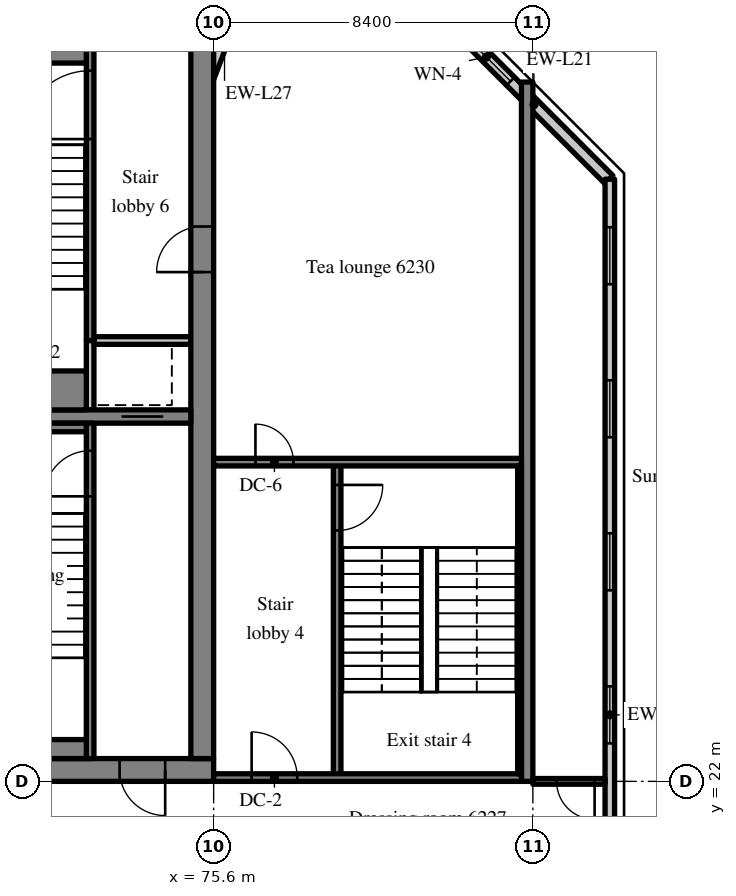
"""IFC4 building model, lengths in metres.
Left out: names, types, materials, properties, quantities, classifications, styles, units other than length and angle.
Written with IfcOpenShell. Run it as: python <this file> out.ifc"""

import sys

from ifc_helpers import new_model, si_unit, direction, frame, frame_2d, origin, place, context, subcontext, project, spatial, rectangle, extrude, source, transform, mapped, element, fill, save


model = new_model("IFC4")
c1 = context("Model", 3, precision=1e-05, world=origin(), true_north=direction((0.0, 1.0)))
c2 = subcontext(c1, "Body", "Model", "MODEL_VIEW")
j1 = project(units=[si_unit("LENGTHUNIT", "METRE"), si_unit("PLANEANGLEUNIT", "RADIAN")], contexts=[c1])
p1 = place(None, origin())
s1 = spatial("IfcSite", under=j1, at=p1, CompositionType="ELEMENT")
p2 = place(p1, origin())
s2 = spatial("IfcBuilding", under=s1, at=p2, CompositionType="ELEMENT")
p3 = place(p2, frame((0.0, 0.0, 256.9)))
s3 = spatial("IfcBuildingStorey", under=s2, at=p3, CompositionType="ELEMENT", Elevation=256.9)
m1 = source(origin(), c2, "Body", "SweptSolid", [
    extrude(rectangle(XDim=50.4, YDim=0.6, at=frame_2d((25.2, 0.0))), origin(), (0.0, 0.0, 1.0), 3.62),
])
p4 = place(p3, frame((25.2, 22.3, 0.0), z_axis=(0.0, 0.0, 1.0), x_axis=(1.0, 0.0, 0.0)))
e1 = element("IfcWall", 1, at=p4, inside=s3, PredefinedType="SHEAR", context=c2, shape_type="MappedRepresentation", body=[
    mapped(m1, transform((0.0, 0.0, 0.0), scale=1.0)),
])
m2 = source(origin(), c2, "Body", "SweptSolid", [
    extrude(rectangle(XDim=1.8, YDim=2.1, at=frame_2d((0.9, 1.05))), frame((0.0, 0.31, 0.0), z_axis=(0.0, -1.0, 0.0), x_axis=(1.0, 0.0, 0.0)), (0.0, 0.0, 1.0), 0.62),
])
p5 = place(p4, frame((15.9, 0.0, 0.0)))
e2 = element("IfcOpeningElement", 2, at=p5, cuts=e1, PredefinedType="OPENING", context=c2, shape_type="MappedRepresentation", body=[
    mapped(m2, transform((0.0, 0.0, 0.0), scale=1.0)),
])
m3 = source(origin(), c2, "Body", "SweptSolid", [
    extrude(rectangle(XDim=0.9, YDim=2.1, at=frame_2d((0.45, 1.05))), frame((0.0, 0.31, 0.0), z_axis=(0.0, -1.0, 0.0), x_axis=(1.0, 0.0, 0.0)), (0.0, 0.0, 1.0), 0.62),
])
p6 = place(p4, frame((21.513, 0.0, 0.0)))
e3 = element("IfcOpeningElement", 3, at=p6, cuts=e1, PredefinedType="OPENING", context=c2, shape_type="MappedRepresentation", body=[
    mapped(m3, transform((0.0, 0.0, 0.0), scale=1.0)),
])
p7 = place(p4, frame((32.7, 0.0, 0.0)))
e4 = element("IfcOpeningElement", 4, at=p7, cuts=e1, PredefinedType="OPENING", context=c2, shape_type="MappedRepresentation", body=[
    mapped(m2, transform((0.0, 0.0, 0.0), scale=1.0)),
])
m4 = source(origin(), c2, "Body", "SweptSolid", [
    extrude(rectangle(XDim=1.2, YDim=2.1, at=frame_2d((0.6, 1.05))), frame((0.0, 0.31, 0.0), z_axis=(0.0, -1.0, 0.0), x_axis=(1.0, 0.0, 0.0)), (0.0, 0.0, 1.0), 0.62),
])
p8 = place(p4, frame((6.488, 0.0, 0.0)))
e5 = element("IfcOpeningElement", 5, at=p8, cuts=e1, PredefinedType="OPENING", context=c2, shape_type="MappedRepresentation", body=[
    mapped(m4, transform((0.0, 0.0, 0.0), scale=1.0)),
])
p9 = place(p4, frame((47.925, 0.0, 0.0)))
e6 = element("IfcOpeningElement", 6, at=p9, cuts=e1, PredefinedType="OPENING", context=c2, shape_type="MappedRepresentation", body=[
    mapped(m4, transform((0.0, 0.0, 0.0), scale=1.0)),
])
m5 = source(origin(), c2, "Body", "SweptSolid", [
    extrude(rectangle(XDim=18.8, YDim=0.6, at=frame_2d((9.4, 0.0))), origin(), (0.0, 0.0, 1.0), 3.62),
])
p10 = place(p3, frame((75.3, 22.6, 0.0), z_axis=(0.0, 0.0, 1.0), x_axis=(0.0, 1.0, 0.0)))
e7 = element("IfcWall", 7, at=p10, inside=s3, PredefinedType="SHEAR", context=c2, shape_type="MappedRepresentation", body=[
    mapped(m5, transform((0.0, 0.0, 0.0), scale=1.0)),
])
p11 = place(p10, frame((12.8, 0.0, 0.0)))
e8 = element("IfcOpeningElement", 8, at=p11, cuts=e7, PredefinedType="OPENING", context=c2, shape_type="MappedRepresentation", body=[
    mapped(m4, transform((0.0, 0.0, 0.0), scale=1.0)),
])
m6 = source(origin(), c2, "Body", "SweptSolid", [
    extrude(rectangle(XDim=7.625, YDim=0.35, at=frame_2d((3.812, 0.0))), origin(), (0.0, 0.0, 1.0), 3.62),
])
p12 = place(p3, frame((67.375, 31.6, 0.0), z_axis=(0.0, 0.0, 1.0), x_axis=(1.0, 0.0, 0.0)))
e9 = element("IfcWall", 9, at=p12, inside=s3, PredefinedType="SHEAR", context=c2, shape_type="MappedRepresentation", body=[
    mapped(m6, transform((0.0, 0.0, 0.0), scale=1.0)),
])
m7 = source(origin(), c2, "Body", "SweptSolid", [
    extrude(rectangle(XDim=1.1, YDim=2.1, at=frame_2d((0.55, 1.05))), frame((0.0, 0.185, 0.0), z_axis=(0.0, -1.0, 0.0), x_axis=(1.0, 0.0, 0.0)), (0.0, 0.0, 1.0), 0.37),
])
p13 = place(p12, frame((5.8, 0.0, 0.0)))
e10 = element("IfcOpeningElement", 10, at=p13, cuts=e9, PredefinedType="OPENING", context=c2, shape_type="MappedRepresentation", body=[
    mapped(m7, transform((0.0, 0.0, 0.0), scale=1.0)),
])
m8 = source(origin(), c2, "Body", "SweptSolid", [
    extrude(rectangle(XDim=18.4, YDim=0.3, at=frame_2d((9.2, 0.0))), origin(), (0.0, 0.0, 1.0), 3.62),
])
p14 = place(p3, frame((83.85, 22.0, 0.0), z_axis=(0.0, 0.0, 1.0), x_axis=(0.0, 1.0, 0.0)))
e11 = element("IfcWall", 11, at=p14, inside=s3, PredefinedType="SHEAR", context=c2, shape_type="MappedRepresentation", body=[
    mapped(m8, transform((0.0, 0.0, 0.0), scale=1.0)),
])
m9 = source(origin(), c2, "Body", "SweptSolid", [
    extrude(rectangle(XDim=5.576, YDim=0.3, at=frame_2d((2.788, 0.0))), origin(), (0.0, 0.0, 1.0), 3.62),
])
p15 = place(p3, frame((86.0, 37.834, 0.0), z_axis=(0.0, 0.0, 1.0), x_axis=(-0.707106781187, 0.707106781187, 0.0)))
e12 = element("IfcWall", 12, at=p15, inside=s3, PredefinedType="SOLIDWALL", context=c2, shape_type="MappedRepresentation", body=[
    mapped(m9, transform((0.0, 0.0, 0.0), scale=1.0)),
])
m10 = source(origin(), c2, "Body", "SweptSolid", [
    extrude(rectangle(XDim=1.8, YDim=1.5, at=frame_2d((0.9, 0.75))), frame((0.0, 0.16, 0.0), z_axis=(0.0, -1.0, 0.0), x_axis=(1.0, 0.0, 0.0)), (0.0, 0.0, 1.0), 0.32),
])
p16 = place(p15, frame((3.658, 0.0, 0.9)))
e13 = element("IfcOpeningElement", 13, at=p16, cuts=e12, PredefinedType="OPENING", context=c2, shape_type="MappedRepresentation", body=[
    mapped(m10, transform((0.0, 0.0, 0.0), scale=1.0)),
])
m11 = source(origin(), c2, "Body", "SweptSolid", [
    extrude(rectangle(XDim=3.559, YDim=0.3, at=frame_2d((1.78, 0.0))), origin(), (0.0, 0.0, 1.0), 3.62),
])
p17 = place(p3, frame((76.523, 43.292, 0.0), z_axis=(0.0, 0.0, 1.0), x_axis=(-0.35779745313, -0.933799219604, 0.0)))
e14 = element("IfcWall", 14, at=p17, inside=s3, PredefinedType="SOLIDWALL", context=c2, shape_type="MappedRepresentation", body=[
    mapped(m11, transform((0.0, 0.0, 0.0), scale=1.0)),
])
m12 = source(origin(), c2, "Body", "SweptSolid", [
    extrude(rectangle(XDim=1.5, YDim=2.0, at=frame_2d((0.75, 1.0))), frame((0.0, 0.16, 0.0), z_axis=(0.0, -1.0, 0.0), x_axis=(1.0, 0.0, 0.0)), (0.0, 0.0, 1.0), 0.32),
])
p18 = place(p17, frame((0.156, 0.0, 0.9)))
e15 = element("IfcOpeningElement", 15, at=p18, cuts=e14, PredefinedType="OPENING", context=c2, shape_type="MappedRepresentation", body=[
    mapped(m12, transform((0.0, 0.0, 0.0), scale=1.0)),
])
m13 = source(origin(), c2, "Body", "SweptSolid", [
    extrude(rectangle(XDim=28.189, YDim=0.25, at=frame_2d((14.095, 0.0))), origin(), (0.0, 0.0, 1.0), 3.62),
])
p19 = place(p3, frame((86.025, 9.655, 0.0), z_axis=(0.0, 0.0, 1.0), x_axis=(0.0, 1.0, 0.0)))
e16 = element("IfcWall", 16, at=p19, inside=s3, PredefinedType="SOLIDWALL", context=c2, shape_type="MappedRepresentation", body=[
    mapped(m13, transform((0.0, 0.0, 0.0), scale=1.0)),
])
m14 = source(origin(), c2, "Body", "SweptSolid", [
    extrude(rectangle(XDim=1.5, YDim=1.5, at=frame_2d((0.75, 0.75))), frame((0.0, 0.135, 0.0), z_axis=(0.0, -1.0, 0.0), x_axis=(1.0, 0.0, 0.0)), (0.0, 0.0, 1.0), 0.27),
])
p20 = place(p19, frame((1.263, 0.0, 0.9)))
e17 = element("IfcOpeningElement", 17, at=p20, cuts=e16, PredefinedType="OPENING", context=c2, shape_type="MappedRepresentation", body=[
    mapped(m14, transform((0.0, 0.0, 0.0), scale=1.0)),
])
p21 = place(p19, frame((5.291, 0.0, 0.9)))
e18 = element("IfcOpeningElement", 18, at=p21, cuts=e16, PredefinedType="OPENING", context=c2, shape_type="MappedRepresentation", body=[
    mapped(m14, transform((0.0, 0.0, 0.0), scale=1.0)),
])
p22 = place(p19, frame((9.318, 0.0, 0.9)))
e19 = element("IfcOpeningElement", 19, at=p22, cuts=e16, PredefinedType="OPENING", context=c2, shape_type="MappedRepresentation", body=[
    mapped(m14, transform((0.0, 0.0, 0.0), scale=1.0)),
])
p23 = place(p19, frame((13.345, 0.0, 0.9)))
e20 = element("IfcOpeningElement", 20, at=p23, cuts=e16, PredefinedType="OPENING", context=c2, shape_type="MappedRepresentation", body=[
    mapped(m14, transform((0.0, 0.0, 0.0), scale=1.0)),
])
p24 = place(p19, frame((17.372, 0.0, 0.9)))
e21 = element("IfcOpeningElement", 21, at=p24, cuts=e16, PredefinedType="OPENING", context=c2, shape_type="MappedRepresentation", body=[
    mapped(m14, transform((0.0, 0.0, 0.0), scale=1.0)),
])
p25 = place(p19, frame((21.399, 0.0, 0.9)))
e22 = element("IfcOpeningElement", 22, at=p25, cuts=e16, PredefinedType="OPENING", context=c2, shape_type="MappedRepresentation", body=[
    mapped(m14, transform((0.0, 0.0, 0.0), scale=1.0)),
])
p26 = place(p19, frame((25.426, 0.0, 0.9)))
e23 = element("IfcOpeningElement", 23, at=p26, cuts=e16, PredefinedType="OPENING", context=c2, shape_type="MappedRepresentation", body=[
    mapped(m14, transform((0.0, 0.0, 0.0), scale=1.0)),
])
m15 = source(origin(), c2, "Body", "SweptSolid", [
    extrude(rectangle(XDim=8.825, YDim=0.2, at=frame_2d((4.413, 0.0))), origin(), (0.0, 0.0, 1.0), 3.62),
])
p27 = place(p3, frame((72.35, 22.6, 0.0), z_axis=(0.0, 0.0, 1.0), x_axis=(0.0, 1.0, 0.0)))
e24 = element("IfcWall", 24, at=p27, inside=s3, PredefinedType="SOLIDWALL", context=c2, shape_type="MappedRepresentation", body=[
    mapped(m15, transform((0.0, 0.0, 0.0), scale=1.0)),
])
m16 = source(origin(), c2, "Body", "SweptSolid", [
    extrude(rectangle(XDim=1.2, YDim=2.1, at=frame_2d((0.6, 1.05))), frame((0.0, 0.11, 0.0), z_axis=(0.0, -1.0, 0.0), x_axis=(1.0, 0.0, 0.0)), (0.0, 0.0, 1.0), 0.22),
])
p28 = place(p27, frame((6.9, 0.0, 0.0)))
e25 = element("IfcOpeningElement", 25, at=p28, cuts=e24, PredefinedType="OPENING", context=c2, shape_type="MappedRepresentation", body=[
    mapped(m16, transform((0.0, 0.0, 0.0), scale=1.0)),
])
m17 = source(origin(), c2, "Body", "SweptSolid", [
    extrude(rectangle(XDim=1.825, YDim=0.2, at=frame_2d((0.913, 0.0))), origin(), (0.0, 0.0, 1.0), 3.62),
])
p29 = place(p3, frame((72.35, 31.775, 0.0), z_axis=(0.0, 0.0, 1.0), x_axis=(0.0, 1.0, 0.0)))
e26 = element("IfcWall", 26, at=p29, inside=s3, PredefinedType="SOLIDWALL", context=c2, shape_type="MappedRepresentation", body=[
    mapped(m17, transform((0.0, 0.0, 0.0), scale=1.0)),
])
m18 = source(origin(), c2, "Body", "SweptSolid", [
    extrude(rectangle(XDim=2.55, YDim=0.2, at=frame_2d((1.275, 0.0))), origin(), (0.0, 0.0, 1.0), 3.62),
])
p30 = place(p3, frame((72.45, 33.6, 0.0), z_axis=(0.0, 0.0, 1.0), x_axis=(1.0, 0.0, 0.0)))
e27 = element("IfcWall", 27, at=p30, inside=s3, PredefinedType="SOLIDWALL", context=c2, shape_type="MappedRepresentation", body=[
    mapped(m18, transform((0.0, 0.0, 0.0), scale=1.0)),
])
m19 = source(origin(), c2, "Body", "SweptSolid", [
    extrude(rectangle(XDim=7.8, YDim=0.2, at=frame_2d((3.9, 0.0))), origin(), (0.0, 0.0, 1.0), 3.62),
])
p31 = place(p3, frame((72.35, 33.6, 0.0), z_axis=(0.0, 0.0, 1.0), x_axis=(0.0, 1.0, 0.0)))
e28 = element("IfcWall", 28, at=p31, inside=s3, PredefinedType="SOLIDWALL", context=c2, shape_type="MappedRepresentation", body=[
    mapped(m19, transform((0.0, 0.0, 0.0), scale=1.0)),
])
m20 = source(origin(), c2, "Body", "SweptSolid", [
    extrude(rectangle(XDim=1.8, YDim=2.1, at=frame_2d((0.9, 1.05))), frame((0.0, 0.11, 0.0), z_axis=(0.0, -1.0, 0.0), x_axis=(1.0, 0.0, 0.0)), (0.0, 0.0, 1.0), 0.22),
])
p32 = place(p31, frame((5.3, 0.0, 0.0)))
e29 = element("IfcOpeningElement", 29, at=p32, cuts=e28, PredefinedType="OPENING", context=c2, shape_type="MappedRepresentation", body=[
    mapped(m20, transform((0.0, 0.0, 0.0), scale=1.0)),
])
m21 = source(origin(), c2, "Body", "SweptSolid", [
    extrude(rectangle(XDim=8.3, YDim=0.2, at=frame_2d((4.15, 0.0))), origin(), (0.0, 0.0, 1.0), 3.62),
])
p33 = place(p3, frame((78.85, 22.1, 0.0), z_axis=(0.0, 0.0, 1.0), x_axis=(0.0, 1.0, 0.0)))
e30 = element("IfcWall", 30, at=p33, inside=s3, PredefinedType="SOLIDWALL", context=c2, shape_type="MappedRepresentation", body=[
    mapped(m21, transform((0.0, 0.0, 0.0), scale=1.0)),
])
p34 = place(p33, frame((6.5, 0.0, 0.0)))
e31 = element("IfcOpeningElement", 31, at=p34, cuts=e30, PredefinedType="OPENING", context=c2, shape_type="MappedRepresentation", body=[
    mapped(m16, transform((0.0, 0.0, 0.0), scale=1.0)),
])
m22 = source(origin(), c2, "Body", "SweptSolid", [
    extrude(rectangle(XDim=8.1, YDim=0.2, at=frame_2d((4.05, 0.0))), origin(), (0.0, 0.0, 1.0), 3.62),
])
p35 = place(p3, frame((83.7, 22.1, 0.0), z_axis=(0.0, 0.0, 1.0), x_axis=(-1.0, 0.0, 0.0)))
e32 = element("IfcWall", 32, at=p35, inside=s3, PredefinedType="SOLIDWALL", context=c2, shape_type="MappedRepresentation", body=[
    mapped(m22, transform((0.0, 0.0, 0.0), scale=1.0)),
])
p36 = place(p35, frame((5.9, 0.0, 0.0)))
e33 = element("IfcOpeningElement", 33, at=p36, cuts=e32, PredefinedType="OPENING", context=c2, shape_type="MappedRepresentation", body=[
    mapped(m16, transform((0.0, 0.0, 0.0), scale=1.0)),
])
p37 = place(p3, frame((83.7, 30.4, 0.0), z_axis=(0.0, 0.0, 1.0), x_axis=(-1.0, 0.0, 0.0)))
e34 = element("IfcWall", 34, at=p37, inside=s3, PredefinedType="SOLIDWALL", context=c2, shape_type="MappedRepresentation", body=[
    mapped(m22, transform((0.0, 0.0, 0.0), scale=1.0)),
])
m23 = source(origin(), c2, "Body", "SweptSolid", [
    extrude(rectangle(XDim=1.0, YDim=2.1, at=frame_2d((0.5, 1.05))), frame((0.0, 0.11, 0.0), z_axis=(0.0, -1.0, 0.0), x_axis=(1.0, 0.0, 0.0)), (0.0, 0.0, 1.0), 0.22),
])
p38 = place(p37, frame((6.0, 0.0, 0.0)))
e35 = element("IfcOpeningElement", 35, at=p38, cuts=e34, PredefinedType="OPENING", context=c2, shape_type="MappedRepresentation", body=[
    mapped(m23, transform((0.0, 0.0, 0.0), scale=1.0)),
])
m24 = source(origin(), c2, "Body", "SweptSolid", [
    extrude(rectangle(XDim=4.875, YDim=0.5, at=frame_2d((2.438, 0.0))), origin(), (0.0, 0.0, 1.0), 3.62),
])
p39 = place(p3, frame((67.375, 22.85, 0.0), z_axis=(0.0, 0.0, 1.0), x_axis=(1.0, 0.0, 0.0)))
e36 = element("IfcWall", 36, at=p39, inside=s3, PredefinedType="SOLIDWALL", context=c2, shape_type="MappedRepresentation", body=[
    mapped(m24, transform((0.0, 0.0, 0.0), scale=1.0)),
])
m25 = source(origin(), c2, "Body", "SweptSolid", [
    extrude(rectangle(XDim=4.875, YDim=0.225, at=frame_2d((2.438, 0.0))), origin(), (0.0, 0.0, 1.0), 3.62),
])
p40 = place(p3, frame((67.375, 31.312, 0.0), z_axis=(0.0, 0.0, 1.0), x_axis=(1.0, 0.0, 0.0)))
e37 = element("IfcWall", 37, at=p40, inside=s3, PredefinedType="SOLIDWALL", context=c2, shape_type="MappedRepresentation", body=[
    mapped(m25, transform((0.0, 0.0, 0.0), scale=1.0)),
])
p41 = place(p3, frame((67.375, 41.15, 0.0), z_axis=(0.0, 0.0, 1.0), x_axis=(1.0, 0.0, 0.0)))
e38 = element("IfcWall", 38, at=p41, inside=s3, PredefinedType="SOLIDWALL", context=c2, shape_type="MappedRepresentation", body=[
    mapped(m24, transform((0.0, 0.0, 0.0), scale=1.0)),
])
m26 = source(origin(), c2, "Body", "SweptSolid", [
    extrude(rectangle(XDim=4.875, YDim=1.025, at=frame_2d((2.438, 0.0))), origin(), (0.0, 0.0, 1.0), 3.62),
])
p42 = place(p3, frame((67.375, 32.287, 0.0), z_axis=(0.0, 0.0, 1.0), x_axis=(1.0, 0.0, 0.0)))
e39 = element("IfcWall", 39, at=p42, inside=s3, PredefinedType="SOLIDWALL", context=c2, shape_type="MappedRepresentation", body=[
    mapped(m26, transform((0.0, 0.0, 0.0), scale=1.0)),
])
m27 = source(origin(), c2, "Body", "SweptSolid", [
    extrude(rectangle(XDim=8.1, YDim=0.1, at=frame_2d((4.05, 0.0))), origin(), (0.0, 0.0, 1.0), 3.62),
])
p43 = place(p3, frame((83.65, 22.2, 0.0), z_axis=(0.0, 0.0, 1.0), x_axis=(0.0, 1.0, 0.0)))
e40 = element("IfcWall", 40, at=p43, inside=s3, PredefinedType="SOLIDWALL", context=c2, shape_type="MappedRepresentation", body=[
    mapped(m27, transform((0.0, 0.0, 0.0), scale=1.0)),
])
m28 = source(origin(), c2, "Body", "SweptSolid", [
    extrude(rectangle(XDim=1.9, YDim=0.15, at=frame_2d((0.95, 0.0))), origin(), (0.0, 0.0, 1.0), 2.92),
])
p44 = place(p3, frame((84.0, 22.0, 0.0), z_axis=(0.0, 0.0, 1.0), x_axis=(1.0, 0.0, 0.0)))
e41 = element("IfcWall", 41, at=p44, inside=s3, PredefinedType="PARTITIONING", context=c2, shape_type="MappedRepresentation", body=[
    mapped(m28, transform((0.0, 0.0, 0.0), scale=1.0)),
])
m29 = source(origin(), c2, "Body", "SweptSolid", [
    extrude(rectangle(XDim=1.0, YDim=2.1, at=frame_2d((0.5, 1.05))), frame((0.0, 0.085, 0.0), z_axis=(0.0, -1.0, 0.0), x_axis=(1.0, 0.0, 0.0)), (0.0, 0.0, 1.0), 0.17),
])
p45 = place(p44, frame((0.625, 0.0, 0.0)))
e42 = element("IfcOpeningElement", 42, at=p45, cuts=e41, PredefinedType="OPENING", context=c2, shape_type="MappedRepresentation", body=[
    mapped(m29, transform((0.0, 0.0, 0.0), scale=1.0)),
])
m30 = source(origin(), c2, "Body", "SweptSolid", [
    extrude(rectangle(XDim=1.8, YDim=1.5, at=frame_2d((0.9, 0.75))), frame((0.0, 0.03, 0.0), z_axis=(0.0, -1.0, 0.0), x_axis=(1.0, 0.0, 0.0)), (0.0, 0.0, 1.0), 0.06),
])
p46 = place(p16, origin())
e43 = element("IfcWindow", 43, at=p46, inside=s3, PartitioningType="SINGLE_PANEL", PredefinedType="WINDOW", context=c2, shape_type="MappedRepresentation", body=[
    mapped(m30, transform((0.0, 0.0, 0.0), scale=1.0)),
])
fill(e13, e43)
m31 = source(origin(), c2, "Body", "SweptSolid", [
    extrude(rectangle(XDim=1.5, YDim=1.5, at=frame_2d((0.75, 0.75))), frame((0.0, 0.03, 0.0), z_axis=(0.0, -1.0, 0.0), x_axis=(1.0, 0.0, 0.0)), (0.0, 0.0, 1.0), 0.06),
])
p47 = place(p23, origin())
e44 = element("IfcWindow", 44, at=p47, inside=s3, PartitioningType="SINGLE_PANEL", PredefinedType="WINDOW", context=c2, shape_type="MappedRepresentation", body=[
    mapped(m31, transform((0.0, 0.0, 0.0), scale=1.0)),
])
fill(e20, e44)
p48 = place(p24, origin())
e45 = element("IfcWindow", 45, at=p48, inside=s3, PartitioningType="SINGLE_PANEL", PredefinedType="WINDOW", context=c2, shape_type="MappedRepresentation", body=[
    mapped(m31, transform((0.0, 0.0, 0.0), scale=1.0)),
])
fill(e21, e45)
p49 = place(p25, origin())
e46 = element("IfcWindow", 46, at=p49, inside=s3, PartitioningType="SINGLE_PANEL", PredefinedType="WINDOW", context=c2, shape_type="MappedRepresentation", body=[
    mapped(m31, transform((0.0, 0.0, 0.0), scale=1.0)),
])
fill(e22, e46)
p50 = place(p26, origin())
e47 = element("IfcWindow", 47, at=p50, inside=s3, PartitioningType="SINGLE_PANEL", PredefinedType="WINDOW", context=c2, shape_type="MappedRepresentation", body=[
    mapped(m31, transform((0.0, 0.0, 0.0), scale=1.0)),
])
fill(e23, e47)
m32 = source(origin(), c2, "Body", "SweptSolid", [
    extrude(rectangle(XDim=1.2, YDim=2.1, at=frame_2d((0.6, 1.05))), frame((0.0, 0.025, 0.0), z_axis=(0.0, -1.0, 0.0), x_axis=(1.0, 0.0, 0.0)), (0.0, 0.0, 1.0), 0.05),
])
p51 = place(p28, origin())
e48 = element("IfcDoor", 48, at=p51, inside=s3, OperationType="SINGLE_SWING_LEFT", PredefinedType="DOOR", context=c2, shape_type="MappedRepresentation", body=[
    mapped(m32, transform((0.0, 0.0, 0.0), scale=1.0)),
])
fill(e25, e48)
m33 = source(origin(), c2, "Body", "SweptSolid", [
    extrude(rectangle(XDim=1.2, YDim=2.1, at=frame_2d((0.6, 1.05))), frame((0.0, 0.225, 0.0), z_axis=(0.0, -1.0, 0.0), x_axis=(1.0, 0.0, 0.0)), (0.0, 0.0, 1.0), 0.05),
])
p52 = place(p9, origin())
e49 = element("IfcDoor", 49, at=p52, inside=s3, OperationType="SINGLE_SWING_RIGHT", PredefinedType="DOOR", context=c2, shape_type="MappedRepresentation", body=[
    mapped(m33, transform((0.0, 0.0, 0.0), scale=1.0)),
])
fill(e6, e49)
m34 = source(origin(), c2, "Body", "SweptSolid", [
    extrude(rectangle(XDim=1.1, YDim=2.1, at=frame_2d((0.55, 1.05))), frame((0.0, 0.025, 0.0), z_axis=(0.0, -1.0, 0.0), x_axis=(1.0, 0.0, 0.0)), (0.0, 0.0, 1.0), 0.05),
])
p53 = place(p13, origin())
e50 = element("IfcDoor", 50, at=p53, inside=s3, OperationType="SLIDING_TO_RIGHT", PredefinedType="DOOR", context=c2, shape_type="MappedRepresentation", body=[
    mapped(m34, transform((0.0, 0.0, 0.0), scale=1.0)),
])
fill(e10, e50)
m35 = source(origin(), c2, "Body", "SweptSolid", [
    extrude(rectangle(XDim=1.8, YDim=2.1, at=frame_2d((0.9, 1.05))), frame((0.0, 0.025, 0.0), z_axis=(0.0, -1.0, 0.0), x_axis=(1.0, 0.0, 0.0)), (0.0, 0.0, 1.0), 0.05),
])
p54 = place(p32, origin())
e51 = element("IfcDoor", 51, at=p54, inside=s3, OperationType="SINGLE_SWING_LEFT", PredefinedType="DOOR", context=c2, shape_type="MappedRepresentation", body=[
    mapped(m35, transform((0.0, 0.0, 0.0), scale=1.0)),
])
fill(e29, e51)
p55 = place(p11, origin())
e52 = element("IfcDoor", 52, at=p55, inside=s3, OperationType="SINGLE_SWING_LEFT", PredefinedType="DOOR", context=c2, shape_type="MappedRepresentation", body=[
    mapped(m32, transform((0.0, 0.0, 0.0), scale=1.0)),
])
fill(e8, e52)
p56 = place(p34, origin())
e53 = element("IfcDoor", 53, at=p56, inside=s3, OperationType="SINGLE_SWING_RIGHT", PredefinedType="DOOR", context=c2, shape_type="MappedRepresentation", body=[
    mapped(m32, transform((0.0, 0.0, 0.0), scale=1.0)),
])
fill(e31, e53)
p57 = place(p36, origin())
e54 = element("IfcDoor", 54, at=p57, inside=s3, OperationType="SINGLE_SWING_RIGHT", PredefinedType="DOOR", context=c2, shape_type="MappedRepresentation", body=[
    mapped(m32, transform((0.0, 0.0, 0.0), scale=1.0)),
])
fill(e33, e54)
m36 = source(origin(), c2, "Body", "SweptSolid", [
    extrude(rectangle(XDim=1.0, YDim=2.1, at=frame_2d((0.5, 1.05))), frame((0.0, 0.025, 0.0), z_axis=(0.0, -1.0, 0.0), x_axis=(1.0, 0.0, 0.0)), (0.0, 0.0, 1.0), 0.05),
])
p58 = place(p38, origin())
e55 = element("IfcDoor", 55, at=p58, inside=s3, OperationType="SINGLE_SWING_RIGHT", PredefinedType="DOOR", context=c2, shape_type="MappedRepresentation", body=[
    mapped(m36, transform((0.0, 0.0, 0.0), scale=1.0)),
])
fill(e35, e55)
p59 = place(p45, origin())
e56 = element("IfcDoor", 56, at=p59, inside=s3, OperationType="SINGLE_SWING_RIGHT", PredefinedType="DOOR", context=c2, shape_type="MappedRepresentation", body=[
    mapped(m36, transform((0.0, 0.0, 0.0), scale=1.0)),
])
fill(e42, e56)
save(model, sys.argv[1])
